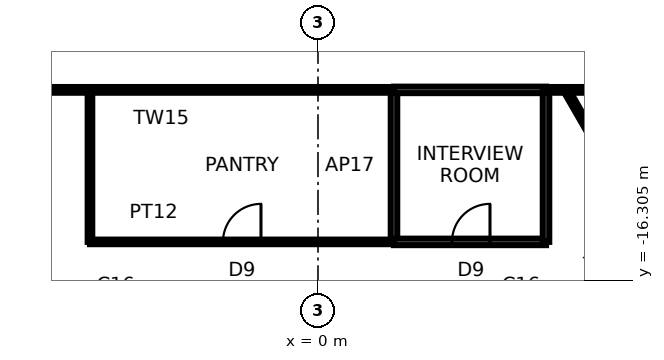
"""IFC4 building model, lengths in metres.
Left out: names, types, materials, properties, quantities, classifications, styles, units other than length and angle.
Written with IfcOpenShell. Run it as: python <this file> out.ifc"""

import sys

from ifc_helpers import new_model, si_unit, direction, frame, frame_2d, origin, place, context, subcontext, project, spatial, rectangle, extrude, element, fill, save


model = new_model("IFC4")
c1 = context("Model", 3, precision=1e-05, world=origin(), true_north=direction((0.0, 1.0)))
c2 = subcontext(c1, "Body", "Model", "MODEL_VIEW")
j1 = project(units=[si_unit("LENGTHUNIT", "METRE"), si_unit("PLANEANGLEUNIT", "RADIAN")], contexts=[c1])
p1 = place(None, origin())
s1 = spatial("IfcSite", under=j1, at=p1, CompositionType="ELEMENT")
p2 = place(p1, origin())
s2 = spatial("IfcBuilding", under=s1, at=p2, CompositionType="ELEMENT")
p3 = place(p2, frame((0.0, 0.0, 147.0)))
s3 = spatial("IfcBuildingStorey", under=s2, at=p3, CompositionType="ELEMENT", Elevation=147.0)
p4 = place(p3, frame((-16.0, -11.3, 0.0), z_axis=(0.0, 0.0, 1.0), x_axis=(1.0, 0.0, 0.0)))
e1 = element("IfcWall", 1, at=p4, inside=s3, PredefinedType="PARTITIONING", context=c2, shape_type="SweptSolid", body=[
    extrude(rectangle(XDim=18.0, YDim=0.15, at=frame_2d((9.0, 0.0))), origin(), (0.0, 0.0, 1.0), 3.74),
])
p5 = place(p4, frame((4.4, 0.0, 0.0)))
e2 = element("IfcOpeningElement", 2, at=p5, cuts=e1, PredefinedType="OPENING", context=c2, shape_type="SweptSolid", body=[
    extrude(rectangle(XDim=1.2, YDim=2.4, at=frame_2d((0.6, 1.2))), frame((0.0, 0.085, 0.0), z_axis=(0.0, -1.0, 0.0), x_axis=(1.0, 0.0, 0.0)), (0.0, 0.0, 1.0), 0.17),
])
p6 = place(p3, frame((-6.0, -11.3, 0.0), z_axis=(0.0, 0.0, 1.0), x_axis=(0.0, -1.0, 0.0)))
e3 = element("IfcWall", 3, at=p6, inside=s3, PredefinedType="PARTITIONING", context=c2, shape_type="SweptSolid", body=[
    extrude(rectangle(XDim=4.0, YDim=0.12, at=frame_2d((2.0, 0.0))), origin(), (0.0, 0.0, 1.0), 3.74),
])
p7 = place(p3, frame((-6.0, -15.3, 0.0), z_axis=(0.0, 0.0, 1.0), x_axis=(1.0, 0.0, 0.0)))
e4 = element("IfcWall", 4, at=p7, inside=s3, PredefinedType="PARTITIONING", context=c2, shape_type="SweptSolid", body=[
    extrude(rectangle(XDim=8.0, YDim=0.12, at=frame_2d((4.0, 0.0))), origin(), (0.0, 0.0, 1.0), 3.286),
])
p8 = place(p7, frame((3.5, 0.0, 0.0)))
e5 = element("IfcOpeningElement", 5, at=p8, cuts=e4, PredefinedType="OPENING", context=c2, shape_type="SweptSolid", body=[
    extrude(rectangle(XDim=1.0, YDim=2.4, at=frame_2d((0.5, 1.2))), frame((0.0, 0.07, 0.0), z_axis=(0.0, -1.0, 0.0), x_axis=(1.0, 0.0, 0.0)), (0.0, 0.0, 1.0), 0.14),
])
p9 = place(p3, frame((2.0, -11.3, 0.0), z_axis=(0.0, 0.0, 1.0), x_axis=(0.0, -1.0, 0.0)))
e6 = element("IfcWall", 6, at=p9, inside=s3, PredefinedType="PARTITIONING", context=c2, shape_type="SweptSolid", body=[
    extrude(rectangle(XDim=4.0, YDim=0.17, at=frame_2d((2.0, 0.0))), origin(), (0.0, 0.0, 1.0), 3.74),
])
p10 = place(p3, frame((2.0, -15.3, 0.0), z_axis=(0.0, 0.0, 1.0), x_axis=(1.0, 0.0, 0.0)))
e7 = element("IfcWall", 7, at=p10, inside=s3, PredefinedType="PARTITIONING", context=c2, shape_type="SweptSolid", body=[
    extrude(rectangle(XDim=4.0, YDim=0.17, at=frame_2d((2.0, 0.0))), origin(), (0.0, 0.0, 1.0), 3.286),
])
p11 = place(p10, frame((1.526, 0.0, 0.0)))
e8 = element("IfcOpeningElement", 8, at=p11, cuts=e7, PredefinedType="OPENING", context=c2, shape_type="SweptSolid", body=[
    extrude(rectangle(XDim=1.0, YDim=2.4, at=frame_2d((0.5, 1.2))), frame((0.0, 0.095, 0.0), z_axis=(0.0, -1.0, 0.0), x_axis=(1.0, 0.0, 0.0)), (0.0, 0.0, 1.0), 0.19),
])
for number, where, z_axis, x_axis in (
    (9, (6.0, -11.3, 0.0), (0.0, 0.0, 1.0), (-1.0, 0.0, 0.0)),
    (10, (6.0, -15.3, 0.0), (0.0, 0.0, 1.0), (0.0, 1.0, 0.0)),
):
    element("IfcWall", number, at=place(p3, frame(where, z_axis=z_axis, x_axis=x_axis)), inside=s3, PredefinedType="PARTITIONING", context=c2, shape_type="SweptSolid", body=[
        extrude(rectangle(XDim=4.0, YDim=0.17, at=frame_2d((2.0, 0.0))), origin(), (0.0, 0.0, 1.0), 3.74),
    ])
p12 = place(p3, frame((11.137, -19.289, 0.0), z_axis=(0.0, 0.0, 1.0), x_axis=(-0.499995827671, 0.866027812666, 0.0)))
e11 = element("IfcWall", 11, at=p12, inside=s3, PredefinedType="PARTITIONING", context=c2, shape_type="SweptSolid", body=[
    extrude(rectangle(XDim=9.225, YDim=0.15, at=frame_2d((4.613, 0.0))), origin(), (0.0, 0.0, 1.0), 3.74),
])
p13 = place(p3, frame((6.0, -11.3, 0.0), z_axis=(0.0, 0.0, 1.0), x_axis=(1.0, 0.0, 0.0)))
e12 = element("IfcWall", 12, at=p13, inside=s3, PredefinedType="PARTITIONING", context=c2, shape_type="SweptSolid", body=[
    extrude(rectangle(XDim=3.0, YDim=0.15, at=frame_2d((1.5, 0.0))), origin(), (0.0, 0.0, 1.0), 3.74),
])
p14 = place(p8, origin())
e13 = element("IfcDoor", 13, at=p14, inside=s3, OperationType="SINGLE_SWING_RIGHT", PredefinedType="DOOR", context=c2, shape_type="SweptSolid", body=[
    extrude(rectangle(XDim=1.0, YDim=2.4, at=frame_2d((0.5, 1.2))), frame((0.0, 0.025, 0.0), z_axis=(0.0, -1.0, 0.0), x_axis=(1.0, 0.0, 0.0)), (0.0, 0.0, 1.0), 0.05),
])
fill(e5, e13)
p15 = place(p11, origin())
e14 = element("IfcDoor", 14, at=p15, inside=s3, OperationType="SINGLE_SWING_RIGHT", PredefinedType="DOOR", context=c2, shape_type="SweptSolid", body=[
    extrude(rectangle(XDim=1.0, YDim=2.4, at=frame_2d((0.5, 1.2))), frame((0.0, 0.025, 0.0), z_axis=(0.0, -1.0, 0.0), x_axis=(1.0, 0.0, 0.0)), (0.0, 0.0, 1.0), 0.05),
])
fill(e8, e14)
save(model, sys.argv[1])
